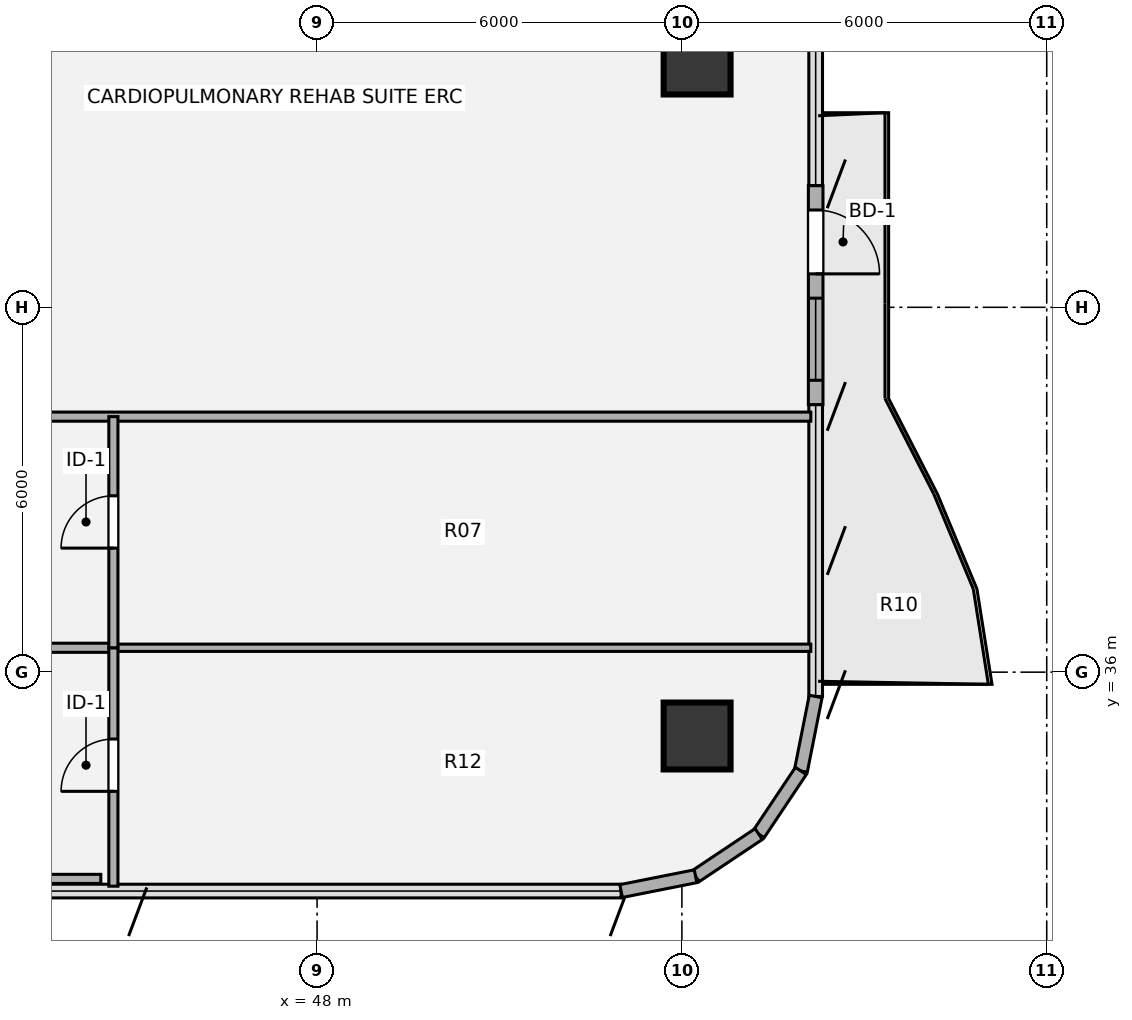
"""IFC4 building model, lengths in metres.
Left out: names, types, materials, properties, quantities, classifications, styles, units other than length and angle.
Written with IfcOpenShell. Run it as: python <this file> out.ifc"""

import sys

from ifc_helpers import new_model, si_unit, direction, frame, frame_2d, origin, origin_2d, place, context, subcontext, project, spatial, rectangle, hollow_circle, extrude, source, transform, mapped, element, fill, save


model = new_model("IFC4")
c1 = context("Model", 3, precision=1e-05, world=origin(), true_north=direction((0.0, 1.0)))
c2 = subcontext(c1, "Body", "Model", "MODEL_VIEW")
j1 = project(units=[si_unit("LENGTHUNIT", "METRE"), si_unit("PLANEANGLEUNIT", "RADIAN")], contexts=[c1])
p1 = place(None, origin())
s1 = spatial("IfcSite", under=j1, at=p1, CompositionType="ELEMENT")
p2 = place(p1, origin())
s2 = spatial("IfcBuilding", under=s1, at=p2, CompositionType="ELEMENT")
p3 = place(p2, frame((0.0, 0.0, 179.1)))
s3 = spatial("IfcBuildingStorey", under=s2, at=p3, CompositionType="ELEMENT", Elevation=179.1)
m1 = source(origin(), c2, "Body", "SweptSolid", [
    extrude(hollow_circle(Radius=0.55, WallThickness=0.04, at=origin_2d()), origin(), (0.0, 0.0, 1.0), 3.78),
])
for number, where, z_axis, x_axis in (
    (1, (54.25, 34.95, 0.0), (0.0, 0.0, 1.0), (1.0, 0.0, 0.0)),
    (2, (54.25, 46.05, 0.0), (0.0, 0.0, 1.0), (1.0, 0.0, 0.0)),
):
    element("IfcColumn", number, at=place(p3, frame(where, z_axis=z_axis, x_axis=x_axis)), inside=s3, PredefinedType="COLUMN", context=c2, shape_type="MappedRepresentation", body=[
        mapped(m1, transform((0.0, 0.0, 0.0), x_axis=(1.0, 0.0, 0.0), y_axis=(0.0, 1.0, 0.0), z_axis=(0.0, 0.0, 1.0), scale=1.0)),
    ])
p4 = place(p3, frame((56.2, 44.0, 0.0), z_axis=(0.0, 0.0, 1.0), x_axis=(0.0, -1.0, 0.0)))
e3 = element("IfcWall", 3, at=p4, inside=s3, PredefinedType="SOLIDWALL", context=c2, shape_type="SweptSolid", body=[
    extrude(rectangle(XDim=3.6, YDim=0.24, at=frame_2d((1.8, 0.0))), origin(), (0.0, 0.0, 1.0), 3.53),
])
p5 = place(p4, frame((0.4, 0.0, 0.0)))
e4 = element("IfcOpeningElement", 4, at=p5, cuts=e3, PredefinedType="OPENING", context=c2, shape_type="SweptSolid", body=[
    extrude(rectangle(XDim=1.05, YDim=2.15, at=origin_2d()), frame((0.525, 0.13, 1.075), z_axis=(0.0, -1.0, 0.0), x_axis=(1.0, 0.0, 0.0)), (0.0, 0.0, 1.0), 0.26),
])
p6 = place(p4, frame((1.85, 0.0, 0.85)))
e5 = element("IfcOpeningElement", 5, at=p6, cuts=e3, PredefinedType="OPENING", context=c2, shape_type="SweptSolid", body=[
    extrude(rectangle(XDim=1.35, YDim=1.35, at=origin_2d()), frame((0.675, 0.13, 0.675), z_axis=(0.0, -1.0, 0.0), x_axis=(1.0, 0.0, 0.0)), (0.0, 0.0, 1.0), 0.26),
])
for number, where, z_axis, x_axis in (
    (6, (56.2, 35.6, 0.0), (0.0, 0.0, 1.0), (-0.195, -0.981, 0.0)),
    (7, (55.956, 34.375, 0.0), (0.0, 0.0, 1.0), (-0.556, -0.831, 0.0)),
    (8, (55.263, 33.337, 0.0), (0.0, 0.0, 1.0), (-0.831, -0.556, 0.0)),
    (9, (54.225, 32.644, 0.0), (0.0, 0.0, 1.0), (-0.981, -0.195, 0.0)),
):
    element("IfcWall", number, at=place(p3, frame(where, z_axis=z_axis, x_axis=x_axis)), inside=s3, PredefinedType="SOLIDWALL", context=c2, shape_type="SweptSolid", body=[
        extrude(rectangle(XDim=1.249, YDim=0.215, at=frame_2d((0.624, 0.0))), origin(), (0.0, 0.0, 1.0), 3.53),
    ])
p7 = place(p3, frame((38.45, 32.6, 0.0), z_axis=(0.0, 0.0, 1.0), x_axis=(1.0, 0.0, 0.0)))
e10 = element("IfcWall", 10, at=p7, inside=s3, PredefinedType="PARTITIONING", context=c2, shape_type="SweptSolid", body=[
    extrude(rectangle(XDim=5.993, YDim=0.15, at=frame_2d((2.997, 0.0))), origin(), (0.0, 0.0, 1.0), 3.5),
])
p8 = place(p3, frame((38.45, 36.401, 0.0), z_axis=(0.0, 0.0, 1.0), x_axis=(1.0, 0.0, 0.0)))
e11 = element("IfcWall", 11, at=p8, inside=s3, PredefinedType="PARTITIONING", context=c2, shape_type="SweptSolid", body=[
    extrude(rectangle(XDim=6.2, YDim=0.15, at=frame_2d((3.1, 0.0))), origin(), (0.0, 0.0, 1.0), 2.982),
])
p9 = place(p3, frame((44.65, 36.401, 0.0), z_axis=(0.0, 0.0, 1.0), x_axis=(1.0, 0.0, 0.0)))
e12 = element("IfcWall", 12, at=p9, inside=s3, PredefinedType="PARTITIONING", context=c2, shape_type="SweptSolid", body=[
    extrude(rectangle(XDim=11.47, YDim=0.12, at=frame_2d((5.735, 0.0))), origin(), (0.0, 0.0, 1.0), 2.982),
])
p10 = place(p3, frame((38.45, 40.202, 0.0), z_axis=(0.0, 0.0, 1.0), x_axis=(1.0, 0.0, 0.0)))
e13 = element("IfcWall", 13, at=p10, inside=s3, PredefinedType="PARTITIONING", context=c2, shape_type="SweptSolid", body=[
    extrude(rectangle(XDim=17.67, YDim=0.15, at=frame_2d((8.835, 0.0))), origin(), (0.0, 0.0, 1.0), 2.982),
])
p11 = place(p3, frame((44.65, 32.48, 0.0), z_axis=(0.0, 0.0, 1.0), x_axis=(0.0, 1.0, 0.0)))
e14 = element("IfcWall", 14, at=p11, inside=s3, PredefinedType="PARTITIONING", context=c2, shape_type="SweptSolid", body=[
    extrude(rectangle(XDim=3.921, YDim=0.15, at=frame_2d((1.96, 0.0))), origin(), (0.0, 0.0, 1.0), 3.5),
])
p12 = place(p11, frame((1.56, 0.0, 0.0)))
e15 = element("IfcOpeningElement", 15, at=p12, cuts=e14, PredefinedType="OPENING", context=c2, shape_type="SweptSolid", body=[
    extrude(rectangle(XDim=0.86, YDim=2.1, at=origin_2d()), frame((0.43, 0.085, 1.05), z_axis=(0.0, -1.0, 0.0), x_axis=(1.0, 0.0, 0.0)), (0.0, 0.0, 1.0), 0.17),
])
p13 = place(p3, frame((44.65, 36.401, 0.0), z_axis=(0.0, 0.0, 1.0), x_axis=(0.0, 1.0, 0.0)))
e16 = element("IfcWall", 16, at=p13, inside=s3, PredefinedType="PARTITIONING", context=c2, shape_type="SweptSolid", body=[
    extrude(rectangle(XDim=3.801, YDim=0.15, at=frame_2d((1.9, 0.0))), origin(), (0.0, 0.0, 1.0), 3.5),
])
p14 = place(p13, frame((1.639, 0.0, 0.0)))
e17 = element("IfcOpeningElement", 17, at=p14, cuts=e16, PredefinedType="OPENING", context=c2, shape_type="SweptSolid", body=[
    extrude(rectangle(XDim=0.86, YDim=2.1, at=origin_2d()), frame((0.43, 0.085, 1.05), z_axis=(0.0, -1.0, 0.0), x_axis=(1.0, 0.0, 0.0)), (0.0, 0.0, 1.0), 0.17),
])
m2 = source(origin(), c2, "Body", "SweptSolid", [
    extrude(rectangle(XDim=1.05, YDim=2.15, at=origin_2d()), frame((0.525, 0.025, 1.075), z_axis=(0.0, -1.0, 0.0), x_axis=(1.0, 0.0, 0.0)), (0.0, 0.0, 1.0), 0.05),
])
p15 = place(p5, origin())
e18 = element("IfcDoor", 18, at=p15, inside=s3, OperationType="SINGLE_SWING_RIGHT", PredefinedType="DOOR", context=c2, shape_type="MappedRepresentation", body=[
    mapped(m2, transform((0.0, 0.0, 0.0), x_axis=(1.0, 0.0, 0.0), y_axis=(0.0, 1.0, 0.0), z_axis=(0.0, 0.0, 1.0), scale=1.0)),
])
fill(e4, e18)
m3 = source(origin(), c2, "Body", "SweptSolid", [
    extrude(rectangle(XDim=1.35, YDim=1.35, at=origin_2d()), frame((0.675, 0.03, 0.675), z_axis=(0.0, -1.0, 0.0), x_axis=(1.0, 0.0, 0.0)), (0.0, 0.0, 1.0), 0.06),
])
p16 = place(p6, origin())
e19 = element("IfcWindow", 19, at=p16, inside=s3, PartitioningType="SINGLE_PANEL", PredefinedType="WINDOW", context=c2, shape_type="MappedRepresentation", body=[
    mapped(m3, transform((0.0, 0.0, 0.0), x_axis=(1.0, 0.0, 0.0), y_axis=(0.0, 1.0, 0.0), z_axis=(0.0, 0.0, 1.0), scale=1.0)),
])
fill(e5, e19)
m4 = source(origin(), c2, "Body", "SweptSolid", [
    extrude(rectangle(XDim=0.86, YDim=2.1, at=origin_2d()), frame((0.43, 0.025, 1.05), z_axis=(0.0, -1.0, 0.0), x_axis=(1.0, 0.0, 0.0)), (0.0, 0.0, 1.0), 0.05),
])
p17 = place(p12, origin())
e20 = element("IfcDoor", 20, at=p17, inside=s3, OperationType="SINGLE_SWING_LEFT", PredefinedType="DOOR", context=c2, shape_type="MappedRepresentation", body=[
    mapped(m4, transform((0.0, 0.0, 0.0), x_axis=(1.0, 0.0, 0.0), y_axis=(0.0, 1.0, 0.0), z_axis=(0.0, 0.0, 1.0), scale=1.0)),
])
fill(e15, e20)
p18 = place(p14, origin())
e21 = element("IfcDoor", 21, at=p18, inside=s3, OperationType="SINGLE_SWING_LEFT", PredefinedType="DOOR", context=c2, shape_type="MappedRepresentation", body=[
    mapped(m4, transform((0.0, 0.0, 0.0), x_axis=(1.0, 0.0, 0.0), y_axis=(0.0, 1.0, 0.0), z_axis=(0.0, 0.0, 1.0), scale=1.0)),
])
fill(e17, e21)
save(model, sys.argv[1])
